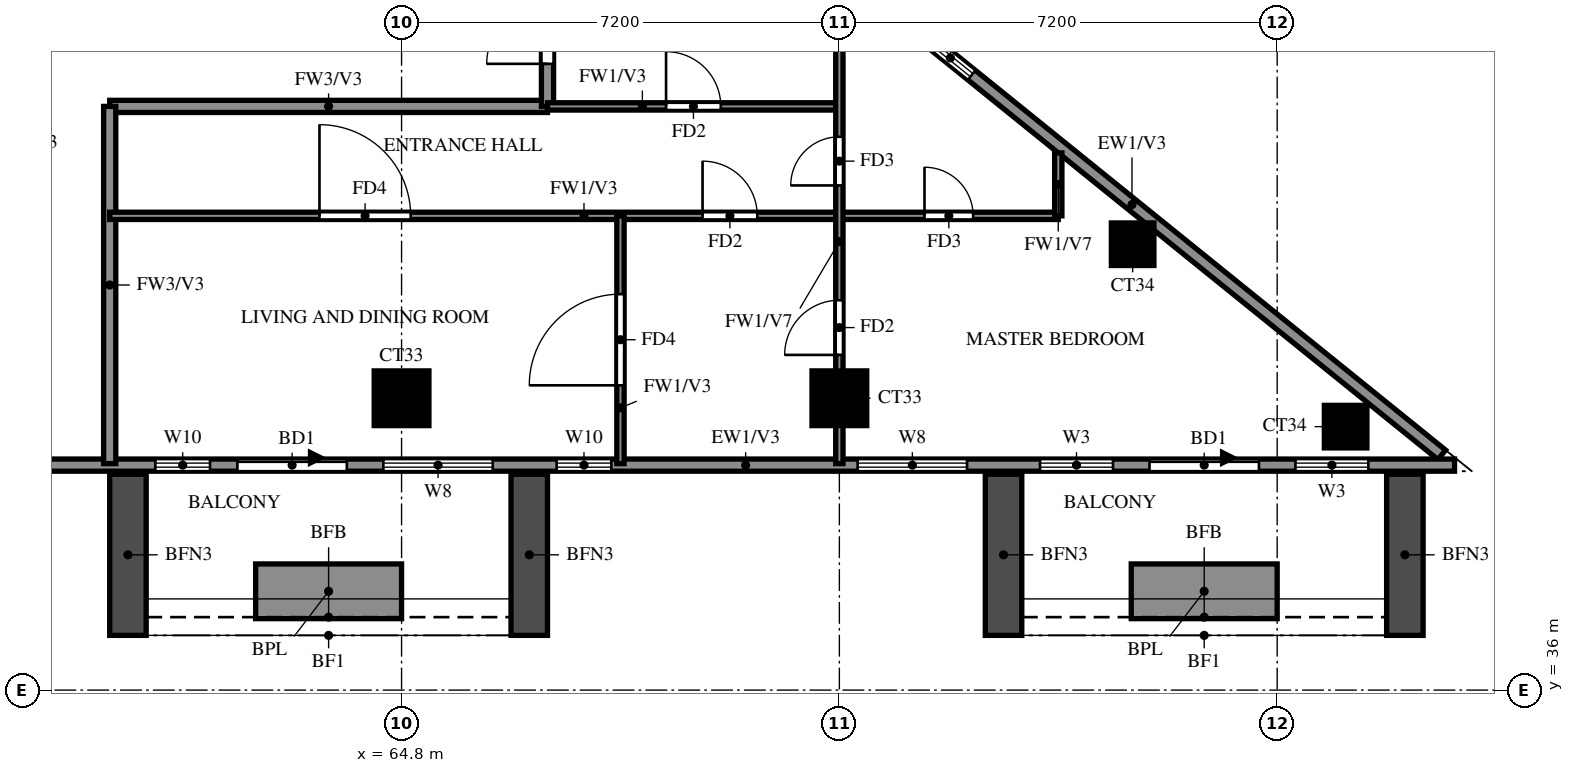
"""IFC4 building model, lengths in metres.
Left out: names, types, materials, properties, quantities, classifications, styles, units other than length and angle.
Written with IfcOpenShell. Run it as: python <this file> out.ifc"""

import sys

from ifc_helpers import new_model, si_unit, direction, frame, frame_2d, origin, origin_2d, place, context, subcontext, project, spatial, rectangle, extrude, source, transform, mapped, element, fill, save


model = new_model("IFC4")
c1 = context("Model", 3, precision=1e-05, world=origin(), true_north=direction((0.0, 1.0)))
c2 = subcontext(c1, "Body", "Model", "MODEL_VIEW")
j1 = project(units=[si_unit("LENGTHUNIT", "METRE"), si_unit("PLANEANGLEUNIT", "RADIAN")], contexts=[c1])
p1 = place(None, origin())
s1 = spatial("IfcSite", under=j1, at=p1, CompositionType="ELEMENT")
p2 = place(p1, origin())
s2 = spatial("IfcBuilding", under=s1, at=p2, CompositionType="ELEMENT")
p3 = place(p2, frame((0.0, 0.0, 225.5)))
s3 = spatial("IfcBuildingStorey", under=s2, at=p3, CompositionType="ELEMENT", Elevation=225.5)
m1 = source(origin(), c2, "Body", "SweptSolid", [
    extrude(rectangle(XDim=0.7, YDim=0.7, at=origin_2d()), origin(), (0.0, 0.0, 1.0), 3.22),
])
p4 = place(p3, frame((80.326, 40.333, 0.0), z_axis=(0.0, 0.0, 1.0), x_axis=(1.0, 0.0, 0.0)))
e1 = element("IfcColumn", 1, at=p4, inside=s3, PredefinedType="COLUMN", context=c2, shape_type="MappedRepresentation", body=[
    mapped(m1, transform((0.0, 0.0, 0.0))),
])
m2 = source(origin(), c2, "Body", "SweptSolid", [
    extrude(rectangle(XDim=0.9, YDim=0.9, at=origin_2d()), origin(), (0.0, 0.0, 1.0), 3.22),
])
for number, where, z_axis, x_axis in (
    (2, (64.8, 40.8, 0.0), (0.0, 0.0, 1.0), (1.0, 0.0, 0.0)),
    (3, (72.0, 40.8, 0.0), (0.0, 0.0, 1.0), (1.0, 0.0, 0.0)),
):
    element("IfcColumn", number, at=place(p3, frame(where, z_axis=z_axis, x_axis=x_axis)), inside=s3, PredefinedType="COLUMN", context=c2, shape_type="MappedRepresentation", body=[
        mapped(m2, transform((0.0, 0.0, 0.0))),
    ])
p5 = place(p3, frame((76.823, 43.333, 0.0), z_axis=(0.0, 0.0, 1.0), x_axis=(1.0, 0.0, 0.0)))
e4 = element("IfcColumn", 4, at=p5, inside=s3, PredefinedType="COLUMN", context=c2, shape_type="MappedRepresentation", body=[
    mapped(m1, transform((0.0, 0.0, 0.0))),
])
p6 = place(p3, frame((81.907, 39.87, 0.0), z_axis=(0.0, 0.0, 1.0), x_axis=(-0.777936274417, 0.62834318087, 0.0)))
e5 = element("IfcWall", 5, at=p6, inside=s3, PredefinedType="SOLIDWALL", context=c2, shape_type="SweptSolid", body=[
    extrude(rectangle(XDim=13.099, YDim=0.2, at=frame_2d((6.549, 0.0))), origin(), (0.0, 0.0, 1.0), 3.22),
])
p7 = place(p6, frame((9.938, 0.0, 1.5)))
e6 = element("IfcOpeningElement", 6, at=p7, cuts=e5, PredefinedType="OPENING", context=c2, shape_type="SweptSolid", body=[
    extrude(rectangle(XDim=0.9, YDim=0.9, at=frame_2d((0.45, 0.45))), frame((0.0, 0.11, 0.0), z_axis=(0.0, -1.0, 0.0), x_axis=(1.0, 0.0, 0.0)), (0.0, 0.0, 1.0), 0.22),
])
p8 = place(p3, frame((58.8, 39.7, 0.0), z_axis=(0.0, 0.0, 1.0), x_axis=(1.0, 0.0, 0.0)))
e7 = element("IfcWall", 7, at=p8, inside=s3, PredefinedType="SOLIDWALL", context=c2, shape_type="SweptSolid", body=[
    extrude(rectangle(XDim=23.317, YDim=0.2, at=frame_2d((11.658, 0.0))), origin(), (0.0, 0.0, 1.0), 3.22),
])
p9 = place(p8, frame((3.3, 0.0, 0.0)))
e8 = element("IfcOpeningElement", 8, at=p9, cuts=e7, PredefinedType="OPENING", context=c2, shape_type="SweptSolid", body=[
    extrude(rectangle(XDim=1.8, YDim=2.4, at=frame_2d((0.9, 1.2))), frame((0.0, 0.11, 0.0), z_axis=(0.0, -1.0, 0.0), x_axis=(1.0, 0.0, 0.0)), (0.0, 0.0, 1.0), 0.22),
])
p10 = place(p8, frame((18.3, 0.0, 0.0)))
e9 = element("IfcOpeningElement", 9, at=p10, cuts=e7, PredefinedType="OPENING", context=c2, shape_type="SweptSolid", body=[
    extrude(rectangle(XDim=1.8, YDim=2.4, at=frame_2d((0.9, 1.2))), frame((0.0, 0.11, 0.0), z_axis=(0.0, -1.0, 0.0), x_axis=(1.0, 0.0, 0.0)), (0.0, 0.0, 1.0), 0.22),
])
p11 = place(p8, frame((1.95, 0.0, 0.6)))
e10 = element("IfcOpeningElement", 10, at=p11, cuts=e7, PredefinedType="OPENING", context=c2, shape_type="SweptSolid", body=[
    extrude(rectangle(XDim=0.9, YDim=2.4, at=frame_2d((0.45, 1.2))), frame((0.0, 0.11, 0.0), z_axis=(0.0, -1.0, 0.0), x_axis=(1.0, 0.0, 0.0)), (0.0, 0.0, 1.0), 0.22),
])
p12 = place(p8, frame((5.7, 0.0, 0.6)))
e11 = element("IfcOpeningElement", 11, at=p12, cuts=e7, PredefinedType="OPENING", context=c2, shape_type="SweptSolid", body=[
    extrude(rectangle(XDim=1.8, YDim=2.4, at=frame_2d((0.9, 1.2))), frame((0.0, 0.11, 0.0), z_axis=(0.0, -1.0, 0.0), x_axis=(1.0, 0.0, 0.0)), (0.0, 0.0, 1.0), 0.22),
])
p13 = place(p8, frame((8.55, 0.0, 0.6)))
e12 = element("IfcOpeningElement", 12, at=p13, cuts=e7, PredefinedType="OPENING", context=c2, shape_type="SweptSolid", body=[
    extrude(rectangle(XDim=0.9, YDim=2.4, at=frame_2d((0.45, 1.2))), frame((0.0, 0.11, 0.0), z_axis=(0.0, -1.0, 0.0), x_axis=(1.0, 0.0, 0.0)), (0.0, 0.0, 1.0), 0.22),
])
p14 = place(p8, frame((13.5, 0.0, 0.6)))
e13 = element("IfcOpeningElement", 13, at=p14, cuts=e7, PredefinedType="OPENING", context=c2, shape_type="SweptSolid", body=[
    extrude(rectangle(XDim=1.8, YDim=2.4, at=frame_2d((0.9, 1.2))), frame((0.0, 0.11, 0.0), z_axis=(0.0, -1.0, 0.0), x_axis=(1.0, 0.0, 0.0)), (0.0, 0.0, 1.0), 0.22),
])
p15 = place(p8, frame((16.5, 0.0, 0.6)))
e14 = element("IfcOpeningElement", 14, at=p15, cuts=e7, PredefinedType="OPENING", context=c2, shape_type="SweptSolid", body=[
    extrude(rectangle(XDim=1.2, YDim=2.4, at=frame_2d((0.6, 1.2))), frame((0.0, 0.11, 0.0), z_axis=(0.0, -1.0, 0.0), x_axis=(1.0, 0.0, 0.0)), (0.0, 0.0, 1.0), 0.22),
])
p16 = place(p8, frame((20.7, 0.0, 0.6)))
e15 = element("IfcOpeningElement", 15, at=p16, cuts=e7, PredefinedType="OPENING", context=c2, shape_type="SweptSolid", body=[
    extrude(rectangle(XDim=1.2, YDim=2.4, at=frame_2d((0.6, 1.2))), frame((0.0, 0.11, 0.0), z_axis=(0.0, -1.0, 0.0), x_axis=(1.0, 0.0, 0.0)), (0.0, 0.0, 1.0), 0.22),
])
for number, where, z_axis, x_axis in (
    (16, (60.3, 39.55, 0.0), (0.0, 0.0, 1.0), (0.0, -1.0, 0.0)),
    (17, (66.9, 39.55, 0.0), (0.0, 0.0, 1.0), (0.0, -1.0, 0.0)),
):
    element("IfcWall", number, at=place(p3, frame(where, z_axis=z_axis, x_axis=x_axis)), inside=s3, PredefinedType="SOLIDWALL", context=c2, shape_type="SweptSolid", body=[
        extrude(rectangle(XDim=2.65, YDim=0.6, at=frame_2d((1.325, 0.0))), origin(), (0.0, 0.0, 1.0), 2.85),
    ])
p17 = place(p3, frame((62.4, 37.625, 0.0), z_axis=(0.0, 0.0, 1.0), x_axis=(1.0, 0.0, 0.0)))
e18 = element("IfcWall", 18, at=p17, inside=s3, PredefinedType="SOLIDWALL", context=c2, shape_type="SweptSolid", body=[
    extrude(rectangle(XDim=2.4, YDim=0.9, at=frame_2d((1.2, 0.0))), origin(), (0.0, 0.0, 1.0), 0.9),
])
for number, where, z_axis, x_axis in (
    (19, (74.7, 39.55, 0.0), (0.0, 0.0, 1.0), (0.0, -1.0, 0.0)),
    (20, (81.3, 39.55, 0.0), (0.0, 0.0, 1.0), (0.0, -1.0, 0.0)),
):
    element("IfcWall", number, at=place(p3, frame(where, z_axis=z_axis, x_axis=x_axis)), inside=s3, PredefinedType="SOLIDWALL", context=c2, shape_type="SweptSolid", body=[
        extrude(rectangle(XDim=2.65, YDim=0.6, at=frame_2d((1.325, 0.0))), origin(), (0.0, 0.0, 1.0), 2.85),
    ])
p18 = place(p3, frame((76.8, 37.625, 0.0), z_axis=(0.0, 0.0, 1.0), x_axis=(1.0, 0.0, 0.0)))
e21 = element("IfcWall", 21, at=p18, inside=s3, PredefinedType="SOLIDWALL", context=c2, shape_type="SweptSolid", body=[
    extrude(rectangle(XDim=2.4, YDim=0.9, at=frame_2d((1.2, 0.0))), origin(), (0.0, 0.0, 1.0), 0.9),
])
p19 = place(p3, frame((60.0, 45.6, 0.0), z_axis=(0.0, 0.0, 1.0), x_axis=(1.0, 0.0, 0.0)))
e22 = element("IfcWall", 22, at=p19, inside=s3, PredefinedType="SOLIDWALL", context=c2, shape_type="SweptSolid", body=[
    extrude(rectangle(XDim=7.2, YDim=0.2, at=frame_2d((3.6, 0.0))), origin(), (0.0, 0.0, 1.0), 3.22),
])
p20 = place(p3, frame((60.0, 39.725, 0.0), z_axis=(0.0, 0.0, 1.0), x_axis=(0.0, 1.0, 0.0)))
e23 = element("IfcWall", 23, at=p20, inside=s3, PredefinedType="SOLIDWALL", context=c2, shape_type="SweptSolid", body=[
    extrude(rectangle(XDim=5.875, YDim=0.2, at=frame_2d((2.938, 0.0))), origin(), (0.0, 0.0, 1.0), 3.22),
])
p21 = place(p3, frame((67.2, 45.6, 0.0), z_axis=(0.0, 0.0, 1.0), x_axis=(0.0, 1.0, 0.0)))
e24 = element("IfcWall", 24, at=p21, inside=s3, PredefinedType="SOLIDWALL", context=c2, shape_type="SweptSolid", body=[
    extrude(rectangle(XDim=10.8, YDim=0.2, at=frame_2d((5.4, 0.0))), origin(), (0.0, 0.0, 1.0), 3.22),
])
p22 = place(p21, frame((9.1, 0.0, 0.0)))
e25 = element("IfcOpeningElement", 25, at=p22, cuts=e24, PredefinedType="OPENING", context=c2, shape_type="SweptSolid", body=[
    extrude(rectangle(XDim=1.0, YDim=2.1, at=frame_2d((0.5, 1.05))), frame((0.0, 0.11, 0.0), z_axis=(0.0, -1.0, 0.0), x_axis=(1.0, 0.0, 0.0)), (0.0, 0.0, 1.0), 0.22),
])
p23 = place(p21, frame((0.7, 0.0, 0.0)))
e26 = element("IfcOpeningElement", 26, at=p23, cuts=e24, PredefinedType="OPENING", context=c2, shape_type="SweptSolid", body=[
    extrude(rectangle(XDim=1.0, YDim=2.1, at=frame_2d((0.5, 1.05))), frame((0.0, 0.11, 0.0), z_axis=(0.0, -1.0, 0.0), x_axis=(1.0, 0.0, 0.0)), (0.0, 0.0, 1.0), 0.22),
])
p24 = place(p3, frame((60.0, 43.8, 0.0), z_axis=(0.0, 0.0, 1.0), x_axis=(1.0, 0.0, 0.0)))
e27 = element("IfcWall", 27, at=p24, inside=s3, PredefinedType="PARTITIONING", context=c2, shape_type="SweptSolid", body=[
    extrude(rectangle(XDim=15.6, YDim=0.12, at=frame_2d((7.8, 0.0))), origin(), (0.0, 0.0, 1.0), 3.22),
])
p25 = place(p24, frame((9.75, 0.0, 0.0)))
e28 = element("IfcOpeningElement", 28, at=p25, cuts=e27, PredefinedType="OPENING", context=c2, shape_type="SweptSolid", body=[
    extrude(rectangle(XDim=0.9, YDim=2.1, at=frame_2d((0.45, 1.05))), frame((0.0, 0.07, 0.0), z_axis=(0.0, -1.0, 0.0), x_axis=(1.0, 0.0, 0.0)), (0.0, 0.0, 1.0), 0.14),
])
p26 = place(p24, frame((3.45, 0.0, 0.0)))
e29 = element("IfcOpeningElement", 29, at=p26, cuts=e27, PredefinedType="OPENING", context=c2, shape_type="SweptSolid", body=[
    extrude(rectangle(XDim=1.5, YDim=2.1, at=frame_2d((0.75, 1.05))), frame((0.0, 0.07, 0.0), z_axis=(0.0, -1.0, 0.0), x_axis=(1.0, 0.0, 0.0)), (0.0, 0.0, 1.0), 0.14),
])
p27 = place(p24, frame((13.4, 0.0, 0.0)))
e30 = element("IfcOpeningElement", 30, at=p27, cuts=e27, PredefinedType="OPENING", context=c2, shape_type="SweptSolid", body=[
    extrude(rectangle(XDim=0.8, YDim=2.1, at=frame_2d((0.4, 1.05))), frame((0.0, 0.07, 0.0), z_axis=(0.0, -1.0, 0.0), x_axis=(1.0, 0.0, 0.0)), (0.0, 0.0, 1.0), 0.14),
])
p28 = place(p3, frame((67.2, 45.6, 0.0), z_axis=(0.0, 0.0, 1.0), x_axis=(1.0, 0.0, 0.0)))
e31 = element("IfcWall", 31, at=p28, inside=s3, PredefinedType="PARTITIONING", context=c2, shape_type="SweptSolid", body=[
    extrude(rectangle(XDim=4.8, YDim=0.12, at=frame_2d((2.4, 0.0))), origin(), (0.0, 0.0, 1.0), 3.22),
])
p29 = place(p28, frame((1.95, 0.0, 0.0)))
e32 = element("IfcOpeningElement", 32, at=p29, cuts=e31, PredefinedType="OPENING", context=c2, shape_type="SweptSolid", body=[
    extrude(rectangle(XDim=0.9, YDim=2.1, at=frame_2d((0.45, 1.05))), frame((0.0, 0.07, 0.0), z_axis=(0.0, -1.0, 0.0), x_axis=(1.0, 0.0, 0.0)), (0.0, 0.0, 1.0), 0.14),
])
p30 = place(p3, frame((68.4, 39.725, 0.0), z_axis=(0.0, 0.0, 1.0), x_axis=(0.0, 1.0, 0.0)))
e33 = element("IfcWall", 33, at=p30, inside=s3, PredefinedType="PARTITIONING", context=c2, shape_type="SweptSolid", body=[
    extrude(rectangle(XDim=4.075, YDim=0.12, at=frame_2d((2.038, 0.0))), origin(), (0.0, 0.0, 1.0), 3.22),
])
p31 = place(p30, frame((1.288, 0.0, 0.0)))
e34 = element("IfcOpeningElement", 34, at=p31, cuts=e33, PredefinedType="OPENING", context=c2, shape_type="SweptSolid", body=[
    extrude(rectangle(XDim=1.5, YDim=2.1, at=frame_2d((0.75, 1.05))), frame((0.0, 0.07, 0.0), z_axis=(0.0, -1.0, 0.0), x_axis=(1.0, 0.0, 0.0)), (0.0, 0.0, 1.0), 0.14),
])
p32 = place(p3, frame((72.0, 39.725, 0.0), z_axis=(0.0, 0.0, 1.0), x_axis=(0.0, 1.0, 0.0)))
e35 = element("IfcWall", 35, at=p32, inside=s3, PredefinedType="PARTITIONING", context=c2, shape_type="SweptSolid", body=[
    extrude(rectangle(XDim=8.114, YDim=0.12, at=frame_2d((4.057, 0.0))), origin(), (0.0, 0.0, 1.0), 2.32),
])
p33 = place(p32, frame((1.788, 0.0, 0.0)))
e36 = element("IfcOpeningElement", 36, at=p33, cuts=e35, PredefinedType="OPENING", context=c2, shape_type="SweptSolid", body=[
    extrude(rectangle(XDim=0.9, YDim=2.1, at=frame_2d((0.45, 1.05))), frame((0.0, 0.07, 0.0), z_axis=(0.0, -1.0, 0.0), x_axis=(1.0, 0.0, 0.0)), (0.0, 0.0, 1.0), 0.14),
])
p34 = place(p32, frame((4.575, 0.0, 0.0)))
e37 = element("IfcOpeningElement", 37, at=p34, cuts=e35, PredefinedType="OPENING", context=c2, shape_type="SweptSolid", body=[
    extrude(rectangle(XDim=0.8, YDim=2.1, at=frame_2d((0.4, 1.05))), frame((0.0, 0.07, 0.0), z_axis=(0.0, -1.0, 0.0), x_axis=(1.0, 0.0, 0.0)), (0.0, 0.0, 1.0), 0.14),
])
p35 = place(p3, frame((75.6, 43.8, 0.0), z_axis=(0.0, 0.0, 1.0), x_axis=(0.0, 1.0, 0.0)))
e38 = element("IfcWall", 38, at=p35, inside=s3, PredefinedType="PARTITIONING", context=c2, shape_type="SweptSolid", body=[
    extrude(rectangle(XDim=1.035, YDim=0.12, at=frame_2d((0.518, 0.0))), origin(), (0.0, 0.0, 1.0), 2.32),
])
p36 = place(p7, origin())
e39 = element("IfcWindow", 39, at=p36, inside=s3, PartitioningType="SINGLE_PANEL", PredefinedType="WINDOW", context=c2, shape_type="SweptSolid", body=[
    extrude(rectangle(XDim=0.9, YDim=0.9, at=frame_2d((0.45, 0.45))), frame((0.0, 0.03, 0.0), z_axis=(0.0, -1.0, 0.0), x_axis=(1.0, 0.0, 0.0)), (0.0, 0.0, 1.0), 0.06),
])
fill(e6, e39)
p37 = place(p9, origin())
e40 = element("IfcDoor", 40, at=p37, inside=s3, OperationType="DOUBLE_DOOR_SLIDING", PredefinedType="DOOR", context=c2, shape_type="SweptSolid", body=[
    extrude(rectangle(XDim=1.8, YDim=2.4, at=frame_2d((0.9, 1.2))), frame((0.0, 0.025, 0.0), z_axis=(0.0, -1.0, 0.0), x_axis=(1.0, 0.0, 0.0)), (0.0, 0.0, 1.0), 0.05),
])
fill(e8, e40)
p38 = place(p10, origin())
e41 = element("IfcDoor", 41, at=p38, inside=s3, OperationType="DOUBLE_DOOR_SLIDING", PredefinedType="DOOR", context=c2, shape_type="SweptSolid", body=[
    extrude(rectangle(XDim=1.8, YDim=2.4, at=frame_2d((0.9, 1.2))), frame((0.0, 0.025, 0.0), z_axis=(0.0, -1.0, 0.0), x_axis=(1.0, 0.0, 0.0)), (0.0, 0.0, 1.0), 0.05),
])
fill(e9, e41)
p39 = place(p11, origin())
e42 = element("IfcWindow", 42, at=p39, inside=s3, PartitioningType="SINGLE_PANEL", PredefinedType="WINDOW", context=c2, shape_type="SweptSolid", body=[
    extrude(rectangle(XDim=0.9, YDim=2.4, at=frame_2d((0.45, 1.2))), frame((0.0, 0.03, 0.0), z_axis=(0.0, -1.0, 0.0), x_axis=(1.0, 0.0, 0.0)), (0.0, 0.0, 1.0), 0.06),
])
fill(e10, e42)
p40 = place(p12, origin())
e43 = element("IfcWindow", 43, at=p40, inside=s3, PartitioningType="DOUBLE_PANEL_VERTICAL", PredefinedType="WINDOW", context=c2, shape_type="SweptSolid", body=[
    extrude(rectangle(XDim=1.8, YDim=2.4, at=frame_2d((0.9, 1.2))), frame((0.0, 0.03, 0.0), z_axis=(0.0, -1.0, 0.0), x_axis=(1.0, 0.0, 0.0)), (0.0, 0.0, 1.0), 0.06),
])
fill(e11, e43)
p41 = place(p13, origin())
e44 = element("IfcWindow", 44, at=p41, inside=s3, PartitioningType="SINGLE_PANEL", PredefinedType="WINDOW", context=c2, shape_type="SweptSolid", body=[
    extrude(rectangle(XDim=0.9, YDim=2.4, at=frame_2d((0.45, 1.2))), frame((0.0, 0.03, 0.0), z_axis=(0.0, -1.0, 0.0), x_axis=(1.0, 0.0, 0.0)), (0.0, 0.0, 1.0), 0.06),
])
fill(e12, e44)
p42 = place(p14, origin())
e45 = element("IfcWindow", 45, at=p42, inside=s3, PartitioningType="DOUBLE_PANEL_VERTICAL", PredefinedType="WINDOW", context=c2, shape_type="SweptSolid", body=[
    extrude(rectangle(XDim=1.8, YDim=2.4, at=frame_2d((0.9, 1.2))), frame((0.0, 0.03, 0.0), z_axis=(0.0, -1.0, 0.0), x_axis=(1.0, 0.0, 0.0)), (0.0, 0.0, 1.0), 0.06),
])
fill(e13, e45)
p43 = place(p15, origin())
e46 = element("IfcWindow", 46, at=p43, inside=s3, PartitioningType="SINGLE_PANEL", PredefinedType="WINDOW", context=c2, shape_type="SweptSolid", body=[
    extrude(rectangle(XDim=1.2, YDim=2.4, at=frame_2d((0.6, 1.2))), frame((0.0, 0.03, 0.0), z_axis=(0.0, -1.0, 0.0), x_axis=(1.0, 0.0, 0.0)), (0.0, 0.0, 1.0), 0.06),
])
fill(e14, e46)
p44 = place(p16, origin())
e47 = element("IfcWindow", 47, at=p44, inside=s3, PartitioningType="SINGLE_PANEL", PredefinedType="WINDOW", context=c2, shape_type="SweptSolid", body=[
    extrude(rectangle(XDim=1.2, YDim=2.4, at=frame_2d((0.6, 1.2))), frame((0.0, 0.03, 0.0), z_axis=(0.0, -1.0, 0.0), x_axis=(1.0, 0.0, 0.0)), (0.0, 0.0, 1.0), 0.06),
])
fill(e15, e47)
p45 = place(p31, origin())
e48 = element("IfcDoor", 48, at=p45, inside=s3, OperationType="SINGLE_SWING_RIGHT", PredefinedType="DOOR", context=c2, shape_type="SweptSolid", body=[
    extrude(rectangle(XDim=1.5, YDim=2.1, at=frame_2d((0.75, 1.05))), frame((0.0, 0.025, 0.0), z_axis=(0.0, -1.0, 0.0), x_axis=(1.0, 0.0, 0.0)), (0.0, 0.0, 1.0), 0.05),
])
fill(e34, e48)
p46 = place(p29, origin())
e49 = element("IfcDoor", 49, at=p46, inside=s3, OperationType="SINGLE_SWING_LEFT", PredefinedType="DOOR", context=c2, shape_type="SweptSolid", body=[
    extrude(rectangle(XDim=0.9, YDim=2.1, at=frame_2d((0.45, 1.05))), frame((0.0, 0.025, 0.0), z_axis=(0.0, -1.0, 0.0), x_axis=(1.0, 0.0, 0.0)), (0.0, 0.0, 1.0), 0.05),
])
fill(e32, e49)
p47 = place(p23, origin())
e50 = element("IfcDoor", 50, at=p47, inside=s3, OperationType="SINGLE_SWING_LEFT", PredefinedType="DOOR", context=c2, shape_type="SweptSolid", body=[
    extrude(rectangle(XDim=1.0, YDim=2.1, at=frame_2d((0.5, 1.05))), frame((0.0, 0.025, 0.0), z_axis=(0.0, -1.0, 0.0), x_axis=(1.0, 0.0, 0.0)), (0.0, 0.0, 1.0), 0.05),
])
fill(e26, e50)
p48 = place(p25, origin())
e51 = element("IfcDoor", 51, at=p48, inside=s3, OperationType="SINGLE_SWING_RIGHT", PredefinedType="DOOR", context=c2, shape_type="SweptSolid", body=[
    extrude(rectangle(XDim=0.9, YDim=2.1, at=frame_2d((0.45, 1.05))), frame((0.0, 0.025, 0.0), z_axis=(0.0, -1.0, 0.0), x_axis=(1.0, 0.0, 0.0)), (0.0, 0.0, 1.0), 0.05),
])
fill(e28, e51)
p49 = place(p26, origin())
e52 = element("IfcDoor", 52, at=p49, inside=s3, OperationType="SINGLE_SWING_LEFT", PredefinedType="DOOR", context=c2, shape_type="SweptSolid", body=[
    extrude(rectangle(XDim=1.5, YDim=2.1, at=frame_2d((0.75, 1.05))), frame((0.0, 0.025, 0.0), z_axis=(0.0, -1.0, 0.0), x_axis=(1.0, 0.0, 0.0)), (0.0, 0.0, 1.0), 0.05),
])
fill(e29, e52)
p50 = place(p33, origin())
e53 = element("IfcDoor", 53, at=p50, inside=s3, OperationType="SINGLE_SWING_RIGHT", PredefinedType="DOOR", context=c2, shape_type="SweptSolid", body=[
    extrude(rectangle(XDim=0.9, YDim=2.1, at=frame_2d((0.45, 1.05))), frame((0.0, 0.025, 0.0), z_axis=(0.0, -1.0, 0.0), x_axis=(1.0, 0.0, 0.0)), (0.0, 0.0, 1.0), 0.05),
])
fill(e36, e53)
p51 = place(p34, origin())
e54 = element("IfcDoor", 54, at=p51, inside=s3, OperationType="SINGLE_SWING_RIGHT", PredefinedType="DOOR", context=c2, shape_type="SweptSolid", body=[
    extrude(rectangle(XDim=0.8, YDim=2.1, at=frame_2d((0.4, 1.05))), frame((0.0, 0.025, 0.0), z_axis=(0.0, -1.0, 0.0), x_axis=(1.0, 0.0, 0.0)), (0.0, 0.0, 1.0), 0.05),
])
fill(e37, e54)
p52 = place(p27, origin())
e55 = element("IfcDoor", 55, at=p52, inside=s3, OperationType="SINGLE_SWING_LEFT", PredefinedType="DOOR", context=c2, shape_type="SweptSolid", body=[
    extrude(rectangle(XDim=0.8, YDim=2.1, at=frame_2d((0.4, 1.05))), frame((0.0, 0.025, 0.0), z_axis=(0.0, -1.0, 0.0), x_axis=(1.0, 0.0, 0.0)), (0.0, 0.0, 1.0), 0.05),
])
fill(e30, e55)
save(model, sys.argv[1])
